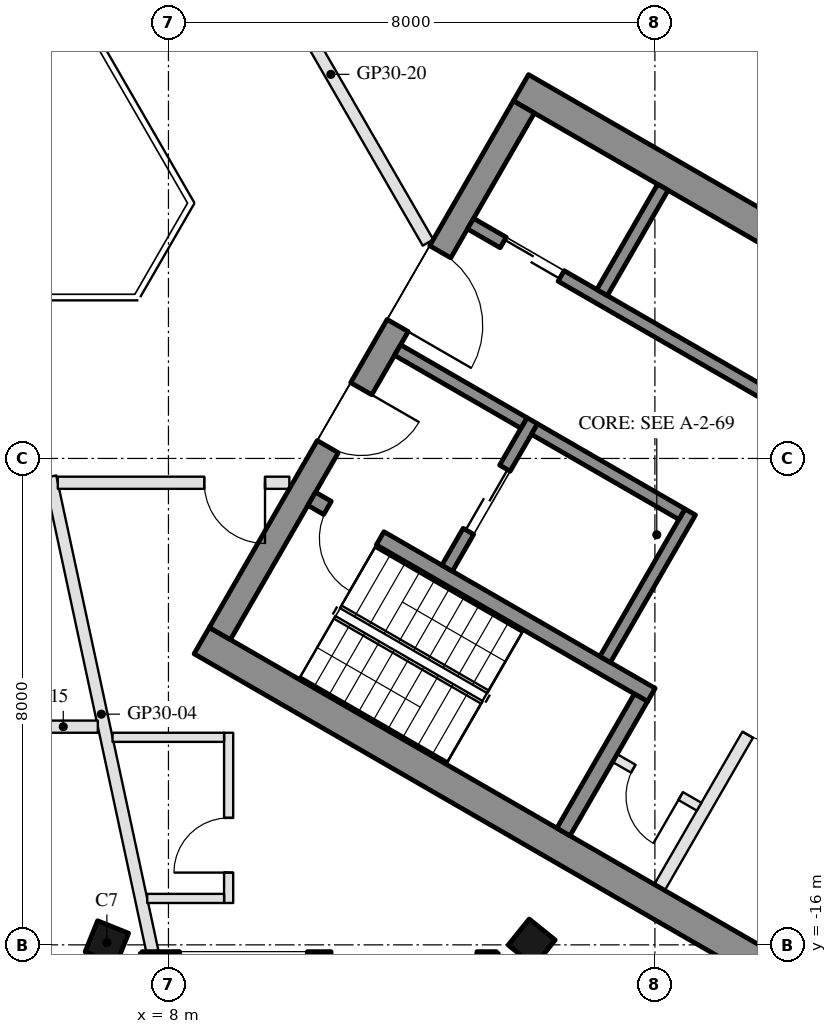
"""IFC4 building model, lengths in metres.
Left out: names, types, materials, properties, quantities, classifications, styles, units other than length and angle.
Written with IfcOpenShell. Run it as: python <this file> out.ifc"""

import sys

from ifc_helpers import new_model, si_unit, direction, frame, frame_2d, origin, origin_2d, place, context, subcontext, project, spatial, rectangle, hollow_rectangle, extrude, boolean, halfspace, element, fill, save


model = new_model("IFC4")
c1 = context("Model", 3, precision=1e-05, world=origin(), true_north=direction((0.0, 1.0)))
c2 = subcontext(c1, "Body", "Model", "MODEL_VIEW")
j1 = project(units=[si_unit("LENGTHUNIT", "METRE"), si_unit("PLANEANGLEUNIT", "RADIAN")], contexts=[c1])
p1 = place(None, origin())
s1 = spatial("IfcSite", under=j1, at=p1, CompositionType="ELEMENT")
p2 = place(p1, origin())
s2 = spatial("IfcBuilding", under=s1, at=p2, CompositionType="ELEMENT")
p3 = place(p2, frame((0.0, 0.0, 298.5)))
s3 = spatial("IfcBuildingStorey", under=s2, at=p3, CompositionType="ELEMENT", Elevation=298.5)
p4 = place(p3, frame((6.987, -15.962, 0.0), z_axis=(-0.060870463553, 0.151232178432, 0.986622326361), x_axis=(0.998135049207, 0.004661833801, 0.060866171632)))
e1 = element("IfcColumn", 1, at=p4, inside=s3, PredefinedType="COLUMN", context=c2, shape_type="SweptSolid", body=[
    boolean("DIFFERENCE", boolean("DIFFERENCE", extrude(hollow_rectangle(XDim=0.55, YDim=0.55, WallThickness=0.025, at=origin_2d()), origin(), (0.0, 0.0, 1.0), 3.75), halfspace(frame((0.0, 0.0, 0.034), z_axis=(0.0, 0.0, 1.0), x_axis=(1.0, 0.0, 0.0)), True)), halfspace(frame((0.0, 0.0, 3.716), z_axis=(0.0, 0.0, 1.0), x_axis=(1.0, 0.0, 0.0)), False)),
])
p5 = place(p3, frame((13.974, -15.962, 0.0), z_axis=(-0.121006106938, 0.150399778714, 0.981191840899), x_axis=(0.992607126943, 0.008959505222, 0.121040566785)))
e2 = element("IfcColumn", 2, at=p5, inside=s3, PredefinedType="COLUMN", context=c2, shape_type="SweptSolid", body=[
    boolean("DIFFERENCE", boolean("DIFFERENCE", extrude(hollow_rectangle(XDim=0.55, YDim=0.55, WallThickness=0.025, at=origin_2d()), origin(), (0.0, 0.0, 1.0), 3.771), halfspace(frame((0.0, 0.0, 0.04), z_axis=(0.0, 0.0, 1.0), x_axis=(1.0, 0.0, 0.0)), True)), halfspace(frame((0.0, 0.0, 3.731), z_axis=(0.0, 0.0, 1.0), x_axis=(1.0, 0.0, 0.0)), False)),
])
p6 = place(p3, frame((7.712, -17.362, 0.0), z_axis=(0.0, 0.0, 1.0), x_axis=(0.0, 1.0, 0.0)))
e3 = element("IfcWall", 3, at=p6, inside=s3, PredefinedType="SOLIDWALL", context=c2, shape_type="SweptSolid", body=[
    extrude(rectangle(XDim=1.22, YDim=0.35, at=frame_2d((0.61, 0.0))), origin(), (0.0, 0.0, 1.0), 3.55),
])
p7 = place(p3, frame((7.567, -16.287, 0.0), z_axis=(0.0, 0.0, 1.0), x_axis=(1.0, 0.0, 0.0)))
e4 = element("IfcWall", 4, at=p7, inside=s3, PredefinedType="SOLIDWALL", context=c2, shape_type="SweptSolid", body=[
    extrude(rectangle(XDim=5.827, YDim=0.35, at=frame_2d((2.914, 0.0))), origin(), (0.0, 0.0, 1.0), 3.55),
])
p8 = place(p7, frame((3.107, 0.0, 0.0)))
e5 = element("IfcOpeningElement", 5, at=p8, cuts=e4, PredefinedType="OPENING", context=c2, shape_type="SweptSolid", body=[
    extrude(rectangle(XDim=2.4, YDim=2.4, at=frame_2d((1.2, 1.2))), frame((0.0, 0.185, 0.0), z_axis=(0.0, -1.0, 0.0), x_axis=(1.0, 0.0, 0.0)), (0.0, 0.0, 1.0), 0.37),
])
p9 = place(p7, frame((0.617, 0.0, 0.3)))
e6 = element("IfcOpeningElement", 6, at=p9, cuts=e4, PredefinedType="OPENING", context=c2, shape_type="SweptSolid", body=[
    extrude(rectangle(XDim=2.1, YDim=2.65, at=frame_2d((1.05, 1.325))), frame((0.0, 0.185, 0.0), z_axis=(0.0, -1.0, 0.0), x_axis=(1.0, 0.0, 0.0)), (0.0, 0.0, 1.0), 0.37),
])
p10 = place(p3, frame((13.249, -16.142, 0.0), z_axis=(0.0, 0.0, 1.0), x_axis=(0.0, -1.0, 0.0)))
e7 = element("IfcWall", 7, at=p10, inside=s3, PredefinedType="SOLIDWALL", context=c2, shape_type="SweptSolid", body=[
    extrude(rectangle(XDim=1.22, YDim=0.35, at=frame_2d((0.61, 0.0))), origin(), (0.0, 0.0, 1.0), 3.55),
])
for number, where, z_axis, x_axis in (
    (8, (8.547, -10.997, 0.0), (0.0, 0.0, 1.0), (0.866, -0.5, 0.0)),
    (9, (13.797, -1.903, 0.0), (0.0, 0.0, 1.0), (0.866, -0.5, 0.0)),
):
    element("IfcWall", number, at=place(p3, frame(where, z_axis=z_axis, x_axis=x_axis)), inside=s3, PredefinedType="SHEAR", context=c2, shape_type="SweptSolid", body=[
        extrude(rectangle(XDim=11.222, YDim=0.5, at=frame_2d((5.611, 0.0))), origin(), (0.0, 0.0, 1.0), 3.5),
    ])
p11 = place(p3, frame((8.845, -10.88, 0.0), z_axis=(0.0, 0.0, 1.0), x_axis=(0.500004234368, 0.866022959057, 0.0)))
e10 = element("IfcWall", 10, at=p11, inside=s3, PredefinedType="SHEAR", context=c2, shape_type="SweptSolid", body=[
    extrude(rectangle(XDim=10.0, YDim=0.4, at=frame_2d((5.0, 0.0))), origin(), (0.0, 0.0, 1.0), 3.5),
])
p12 = place(p11, frame((3.55, 0.0, 0.0)))
e11 = element("IfcOpeningElement", 11, at=p12, cuts=e10, PredefinedType="OPENING", context=c2, shape_type="SweptSolid", body=[
    extrude(rectangle(XDim=1.1, YDim=2.1, at=frame_2d((0.55, 1.05))), frame((0.0, 0.21, 0.0), z_axis=(0.0, -1.0, 0.0), x_axis=(1.0, 0.0, 0.0)), (0.0, 0.0, 1.0), 0.42),
])
p13 = place(p11, frame((5.85, 0.0, 0.0)))
e12 = element("IfcOpeningElement", 12, at=p13, cuts=e10, PredefinedType="OPENING", context=c2, shape_type="SweptSolid", body=[
    extrude(rectangle(XDim=1.4, YDim=2.1, at=frame_2d((0.7, 1.05))), frame((0.0, 0.21, 0.0), z_axis=(0.0, -1.0, 0.0), x_axis=(1.0, 0.0, 0.0)), (0.0, 0.0, 1.0), 0.42),
])
p14 = place(p3, frame((10.356, -8.664, 0.0), z_axis=(0.0, 0.0, 1.0), x_axis=(0.866028629588, -0.499994412703, 0.0)))
e13 = element("IfcWall", 13, at=p14, inside=s3, PredefinedType="SHEAR", context=c2, shape_type="SweptSolid", body=[
    extrude(rectangle(XDim=6.45, YDim=0.25, at=frame_2d((3.225, 0.0))), origin(), (0.0, 0.0, 1.0), 3.5),
])
p15 = place(p14, frame((0.3, 0.0, 0.0)))
e14 = element("IfcOpeningElement", 14, at=p15, cuts=e13, PredefinedType="OPENING", context=c2, shape_type="SweptSolid", body=[
    extrude(rectangle(XDim=1.0, YDim=2.1, at=frame_2d((0.5, 1.05))), frame((0.0, 0.135, 0.0), z_axis=(0.0, -1.0, 0.0), x_axis=(1.0, 0.0, 0.0)), (0.0, 0.0, 1.0), 0.27),
])
p16 = place(p3, frame((14.496, -14.143, 0.0), z_axis=(0.0, 0.0, 1.0), x_axis=(0.500062241894, 0.865989465428, 0.0)))
e15 = element("IfcWall", 15, at=p16, inside=s3, PredefinedType="SHEAR", context=c2, shape_type="SweptSolid", body=[
    extrude(rectangle(XDim=2.55, YDim=0.25, at=frame_2d((1.275, 0.0))), origin(), (0.0, 0.0, 1.0), 3.5),
])
p17 = place(p3, frame((15.181, -11.305, 0.0), z_axis=(0.0, 0.0, 1.0), x_axis=(0.49994636267, 0.866056369097, 0.0)))
e16 = element("IfcWall", 16, at=p17, inside=s3, PredefinedType="SHEAR", context=c2, shape_type="SweptSolid", body=[
    extrude(rectangle(XDim=2.8, YDim=0.2, at=frame_2d((1.4, 0.0))), origin(), (0.0, 0.0, 1.0), 3.5),
])
p18 = place(p3, frame((12.583, -9.805, 0.0), z_axis=(0.0, 0.0, 1.0), x_axis=(0.49994636267, 0.866056369097, 0.0)))
e17 = element("IfcWall", 17, at=p18, inside=s3, PredefinedType="SHEAR", context=c2, shape_type="SweptSolid", body=[
    extrude(rectangle(XDim=2.8, YDim=0.2, at=frame_2d((1.4, 0.0))), origin(), (0.0, 0.0, 1.0), 3.5),
])
p19 = place(p18, frame((0.7, 0.0, 0.0)))
e18 = element("IfcOpeningElement", 18, at=p19, cuts=e17, PredefinedType="OPENING", context=c2, shape_type="SweptSolid", body=[
    extrude(rectangle(XDim=1.2, YDim=2.1, at=frame_2d((0.6, 1.05))), frame((0.0, 0.11, 0.0), z_axis=(0.0, -1.0, 0.0), x_axis=(1.0, 0.0, 0.0)), (0.0, 0.0, 1.0), 0.22),
])
p20 = place(p3, frame((11.768, -6.217, 0.0), z_axis=(0.0, 0.0, 1.0), x_axis=(0.866050077142, -0.499957262057, 0.0)))
e19 = element("IfcWall", 19, at=p20, inside=s3, PredefinedType="SHEAR", context=c2, shape_type="SweptSolid", body=[
    extrude(rectangle(XDim=2.4, YDim=0.2, at=frame_2d((1.2, 0.0))), origin(), (0.0, 0.0, 1.0), 3.5),
])
p21 = place(p3, frame((14.02, -7.517, 0.0), z_axis=(0.0, 0.0, 1.0), x_axis=(0.866034573852, -0.49998411664, 0.0)))
e20 = element("IfcWall", 20, at=p21, inside=s3, PredefinedType="SHEAR", context=c2, shape_type="SweptSolid", body=[
    extrude(rectangle(XDim=2.8, YDim=0.2, at=frame_2d((1.4, 0.0))), origin(), (0.0, 0.0, 1.0), 3.5),
])
p22 = place(p3, frame((12.968, -4.138, 0.0), z_axis=(0.0, 0.0, 1.0), x_axis=(0.866028328073, -0.49999493495, 0.0)))
e21 = element("IfcWall", 21, at=p22, inside=s3, PredefinedType="SHEAR", context=c2, shape_type="SweptSolid", body=[
    extrude(rectangle(XDim=10.16, YDim=0.2, at=frame_2d((5.08, 0.0))), origin(), (0.0, 0.0, 1.0), 3.5),
])
p23 = place(p22, frame((0.62, 0.0, 0.0)))
e22 = element("IfcOpeningElement", 22, at=p23, cuts=e21, PredefinedType="OPENING", context=c2, shape_type="SweptSolid", body=[
    extrude(rectangle(XDim=1.1, YDim=2.1, at=frame_2d((0.55, 1.05))), frame((0.0, 0.11, 0.0), z_axis=(0.0, -1.0, 0.0), x_axis=(1.0, 0.0, 0.0)), (0.0, 0.0, 1.0), 0.22),
])
p24 = place(p22, frame((5.8, 0.0, 0.0)))
e23 = element("IfcOpeningElement", 23, at=p24, cuts=e21, PredefinedType="OPENING", context=c2, shape_type="SweptSolid", body=[
    extrude(rectangle(XDim=0.9, YDim=2.1, at=frame_2d((0.45, 1.05))), frame((0.0, 0.11, 0.0), z_axis=(0.0, -1.0, 0.0), x_axis=(1.0, 0.0, 0.0)), (0.0, 0.0, 1.0), 0.22),
])
p25 = place(p3, frame((15.131, -5.272, 0.0), z_axis=(0.0, 0.0, 1.0), x_axis=(0.499972520799, 0.866041268327, 0.0)))
e24 = element("IfcWall", 24, at=p25, inside=s3, PredefinedType="SHEAR", context=c2, shape_type="SweptSolid", body=[
    extrude(rectangle(XDim=2.0, YDim=0.2, at=frame_2d((1.0, 0.0))), origin(), (0.0, 0.0, 1.0), 3.5),
])
p26 = place(p3, frame((16.076, -15.055, 0.0), z_axis=(0.0, 0.0, 1.0), x_axis=(0.499995103361, 0.866028230842, 0.0)))
e25 = element("IfcWall", 25, at=p26, inside=s3, PredefinedType="PARTITIONING", context=c2, shape_type="SweptSolid", body=[
    extrude(rectangle(XDim=5.4, YDim=0.2, at=frame_2d((2.7, 0.0))), origin(), (0.0, 0.0, 1.0), 3.5),
])
p27 = place(p26, frame((2.9, 0.0, 0.0)))
e26 = element("IfcOpeningElement", 26, at=p27, cuts=e25, PredefinedType="OPENING", context=c2, shape_type="SweptSolid", body=[
    extrude(rectangle(XDim=0.9, YDim=2.1, at=frame_2d((0.45, 1.05))), frame((0.0, 0.11, 0.0), z_axis=(0.0, -1.0, 0.0), x_axis=(1.0, 0.0, 0.0)), (0.0, 0.0, 1.0), 0.22),
])
p28 = place(p3, frame((15.342, -12.928, 0.0), z_axis=(0.0, 0.0, 1.0), x_axis=(0.865989903783, -0.500061482766, 0.0)))
e27 = element("IfcWall", 27, at=p28, inside=s3, PredefinedType="PARTITIONING", context=c2, shape_type="SweptSolid", body=[
    extrude(rectangle(XDim=1.6, YDim=0.15, at=frame_2d((0.8, 0.0))), origin(), (0.0, 0.0, 1.0), 3.5),
])
p29 = place(p28, frame((0.35, 0.0, 0.0)))
e28 = element("IfcOpeningElement", 28, at=p29, cuts=e27, PredefinedType="OPENING", context=c2, shape_type="SweptSolid", body=[
    extrude(rectangle(XDim=0.9, YDim=2.1, at=frame_2d((0.45, 1.05))), frame((0.0, 0.085, 0.0), z_axis=(0.0, -1.0, 0.0), x_axis=(1.0, 0.0, 0.0)), (0.0, 0.0, 1.0), 0.17),
])
p30 = place(p3, frame((7.737, -16.112, 0.0), z_axis=(0.0, 0.0, 1.0), x_axis=(-0.210221826162, 0.977653713646, 0.0)))
e29 = element("IfcWall", 29, at=p30, inside=s3, PredefinedType="PARTITIONING", context=c2, shape_type="SweptSolid", body=[
    extrude(rectangle(XDim=7.99, YDim=0.2, at=frame_2d((3.995, 0.0))), origin(), (0.0, 0.0, 1.0), 3.1),
])
p31 = place(p3, frame((6.839, -12.412, 0.0), z_axis=(0.0, 0.0, 1.0), x_axis=(-1.0, 0.0, 0.0)))
e30 = element("IfcWall", 30, at=p31, inside=s3, PredefinedType="PARTITIONING", context=c2, shape_type="SweptSolid", body=[
    extrude(rectangle(XDim=4.739, YDim=0.2, at=frame_2d((2.369, 0.0))), origin(), (0.0, 0.0, 1.0), 3.1),
])
p32 = place(p31, frame((1.869, 0.0, 0.0)))
e31 = element("IfcOpeningElement", 31, at=p32, cuts=e30, PredefinedType="OPENING", context=c2, shape_type="SweptSolid", body=[
    extrude(rectangle(XDim=1.0, YDim=2.1, at=frame_2d((0.5, 1.05))), frame((0.0, 0.11, 0.0), z_axis=(0.0, -1.0, 0.0), x_axis=(1.0, 0.0, 0.0)), (0.0, 0.0, 1.0), 0.22),
])
p33 = place(p3, frame((9.988, -8.4, 0.0), z_axis=(0.0, 0.0, 1.0), x_axis=(-1.0, 0.0, 0.0)))
e32 = element("IfcWall", 32, at=p33, inside=s3, PredefinedType="PARTITIONING", context=c2, shape_type="SweptSolid", body=[
    extrude(rectangle(XDim=3.807, YDim=0.2, at=frame_2d((1.904, 0.0))), origin(), (0.0, 0.0, 1.0), 3.1),
])
p34 = place(p33, frame((0.4, 0.0, 0.0)))
e33 = element("IfcOpeningElement", 33, at=p34, cuts=e32, PredefinedType="OPENING", context=c2, shape_type="SweptSolid", body=[
    extrude(rectangle(XDim=1.0, YDim=2.1, at=frame_2d((0.5, 1.05))), frame((0.0, 0.11, 0.0), z_axis=(0.0, -1.0, 0.0), x_axis=(1.0, 0.0, 0.0)), (0.0, 0.0, 1.0), 0.22),
])
p35 = place(p3, frame((8.99, -15.312, 0.0), z_axis=(0.0, 0.0, 1.0), x_axis=(0.0, 1.0, 0.0)))
e34 = element("IfcWall", 34, at=p35, inside=s3, PredefinedType="PARTITIONING", context=c2, shape_type="SweptSolid", body=[
    extrude(rectangle(XDim=2.8, YDim=0.15, at=frame_2d((1.4, 0.0))), origin(), (0.0, 0.0, 1.0), 3.1),
])
p36 = place(p35, frame((0.5, 0.0, 0.0)))
e35 = element("IfcOpeningElement", 35, at=p36, cuts=e34, PredefinedType="OPENING", context=c2, shape_type="SweptSolid", body=[
    extrude(rectangle(XDim=0.9, YDim=2.1, at=frame_2d((0.45, 1.05))), frame((0.0, 0.085, 0.0), z_axis=(0.0, -1.0, 0.0), x_axis=(1.0, 0.0, 0.0)), (0.0, 0.0, 1.0), 0.17),
])
p37 = place(p3, frame((7.651, -15.237, 0.0), z_axis=(0.0, 0.0, 1.0), x_axis=(1.0, 0.0, 0.0)))
e36 = element("IfcWall", 36, at=p37, inside=s3, PredefinedType="PARTITIONING", context=c2, shape_type="SweptSolid", body=[
    extrude(rectangle(XDim=1.264, YDim=0.15, at=frame_2d((0.632, 0.0))), origin(), (0.0, 0.0, 1.0), 3.1),
])
p38 = place(p3, frame((7.081, -12.587, 0.0), z_axis=(0.0, 0.0, 1.0), x_axis=(1.0, 0.0, 0.0)))
e37 = element("IfcWall", 37, at=p38, inside=s3, PredefinedType="PARTITIONING", context=c2, shape_type="SweptSolid", body=[
    extrude(rectangle(XDim=1.834, YDim=0.15, at=frame_2d((0.917, 0.0))), origin(), (0.0, 0.0, 1.0), 3.55),
])
p39 = place(p3, frame((8.275, 2.468, 0.0), z_axis=(0.0, 0.0, 1.0), x_axis=(0.500004647933, -0.866022720283, 0.0)))
e38 = element("IfcWall", 38, at=p39, inside=s3, PredefinedType="PARTITIONING", context=c2, shape_type="SweptSolid", body=[
    extrude(rectangle(XDim=7.988, YDim=0.2, at=frame_2d((3.994, 0.0))), origin(), (0.0, 0.0, 1.0), 3.1),
])
p40 = place(p39, frame((2.45, 0.0, 0.0)))
e39 = element("IfcOpeningElement", 39, at=p40, cuts=e38, PredefinedType="OPENING", context=c2, shape_type="SweptSolid", body=[
    extrude(rectangle(XDim=1.0, YDim=2.1, at=frame_2d((0.5, 1.05))), frame((0.0, 0.11, 0.0), z_axis=(0.0, -1.0, 0.0), x_axis=(1.0, 0.0, 0.0)), (0.0, 0.0, 1.0), 0.22),
])
p41 = place(p19, origin())
e40 = element("IfcDoor", 40, at=p41, inside=s3, OperationType="DOUBLE_DOOR_SLIDING", PredefinedType="DOOR", context=c2, shape_type="SweptSolid", body=[
    extrude(rectangle(XDim=1.2, YDim=2.1, at=frame_2d((0.6, 1.05))), frame((0.0, 0.025, 0.0), z_axis=(0.0, -1.0, 0.0), x_axis=(1.0, 0.0, 0.0)), (0.0, 0.0, 1.0), 0.05),
])
fill(e18, e40)
p42 = place(p29, frame((0.9, 0.0, 0.0), z_axis=(0.0, 0.0, 1.0), x_axis=(-1.0, 0.0, 0.0)))
e41 = element("IfcDoor", 41, at=p42, inside=s3, OperationType="SINGLE_SWING_LEFT", PredefinedType="DOOR", context=c2, shape_type="SweptSolid", body=[
    extrude(rectangle(XDim=0.9, YDim=2.1, at=frame_2d((0.45, 1.05))), frame((0.0, 0.025, 0.0), z_axis=(0.0, -1.0, 0.0), x_axis=(1.0, 0.0, 0.0)), (0.0, 0.0, 1.0), 0.05),
])
fill(e28, e41)
p43 = place(p23, origin())
e42 = element("IfcDoor", 42, at=p43, inside=s3, OperationType="DOUBLE_DOOR_SLIDING", PredefinedType="DOOR", context=c2, shape_type="SweptSolid", body=[
    extrude(rectangle(XDim=1.1, YDim=2.1, at=frame_2d((0.55, 1.05))), frame((0.0, 0.025, 0.0), z_axis=(0.0, -1.0, 0.0), x_axis=(1.0, 0.0, 0.0)), (0.0, 0.0, 1.0), 0.05),
])
fill(e22, e42)
p44 = place(p27, frame((0.9, 0.0, 0.0), z_axis=(0.0, 0.0, 1.0), x_axis=(-1.0, 0.0, 0.0)))
e43 = element("IfcDoor", 43, at=p44, inside=s3, OperationType="SINGLE_SWING_LEFT", PredefinedType="DOOR", context=c2, shape_type="SweptSolid", body=[
    extrude(rectangle(XDim=0.9, YDim=2.1, at=frame_2d((0.45, 1.05))), frame((0.0, 0.025, 0.0), z_axis=(0.0, -1.0, 0.0), x_axis=(1.0, 0.0, 0.0)), (0.0, 0.0, 1.0), 0.05),
])
fill(e26, e43)
p45 = place(p12, frame((1.1, 0.0, 0.0), z_axis=(0.0, 0.0, 1.0), x_axis=(-1.0, 0.0, 0.0)))
e44 = element("IfcDoor", 44, at=p45, inside=s3, OperationType="SINGLE_SWING_LEFT", PredefinedType="DOOR", context=c2, shape_type="SweptSolid", body=[
    extrude(rectangle(XDim=1.1, YDim=2.1, at=frame_2d((0.55, 1.05))), frame((0.0, 0.025, 0.0), z_axis=(0.0, -1.0, 0.0), x_axis=(1.0, 0.0, 0.0)), (0.0, 0.0, 1.0), 0.05),
])
fill(e11, e44)
p46 = place(p13, frame((1.4, 0.0, 0.0), z_axis=(0.0, 0.0, 1.0), x_axis=(-1.0, 0.0, 0.0)))
e45 = element("IfcDoor", 45, at=p46, inside=s3, OperationType="DOUBLE_DOOR_SINGLE_SWING", PredefinedType="DOOR", context=c2, shape_type="SweptSolid", body=[
    extrude(rectangle(XDim=1.4, YDim=2.1, at=frame_2d((0.7, 1.05))), frame((0.0, 0.025, 0.0), z_axis=(0.0, -1.0, 0.0), x_axis=(1.0, 0.0, 0.0)), (0.0, 0.0, 1.0), 0.05),
])
fill(e12, e45)
p47 = place(p15, frame((1.0, 0.0, 0.0), z_axis=(0.0, 0.0, 1.0), x_axis=(-1.0, 0.0, 0.0)))
e46 = element("IfcDoor", 46, at=p47, inside=s3, OperationType="SINGLE_SWING_LEFT", PredefinedType="DOOR", context=c2, shape_type="SweptSolid", body=[
    extrude(rectangle(XDim=1.0, YDim=2.1, at=frame_2d((0.5, 1.05))), frame((0.0, 0.025, 0.0), z_axis=(0.0, -1.0, 0.0), x_axis=(1.0, 0.0, 0.0)), (0.0, 0.0, 1.0), 0.05),
])
fill(e14, e46)
p48 = place(p36, origin())
e47 = element("IfcDoor", 47, at=p48, inside=s3, OperationType="SINGLE_SWING_LEFT", PredefinedType="DOOR", context=c2, shape_type="SweptSolid", body=[
    extrude(rectangle(XDim=0.9, YDim=2.1, at=frame_2d((0.45, 1.05))), frame((0.0, 0.025, 0.0), z_axis=(0.0, -1.0, 0.0), x_axis=(1.0, 0.0, 0.0)), (0.0, 0.0, 1.0), 0.05),
])
fill(e35, e47)
p49 = place(p34, origin())
e48 = element("IfcDoor", 48, at=p49, inside=s3, OperationType="SINGLE_SWING_LEFT", PredefinedType="DOOR", context=c2, shape_type="SweptSolid", body=[
    extrude(rectangle(XDim=1.0, YDim=2.1, at=frame_2d((0.5, 1.05))), frame((0.0, 0.025, 0.0), z_axis=(0.0, -1.0, 0.0), x_axis=(1.0, 0.0, 0.0)), (0.0, 0.0, 1.0), 0.05),
])
fill(e33, e48)
save(model, sys.argv[1])
